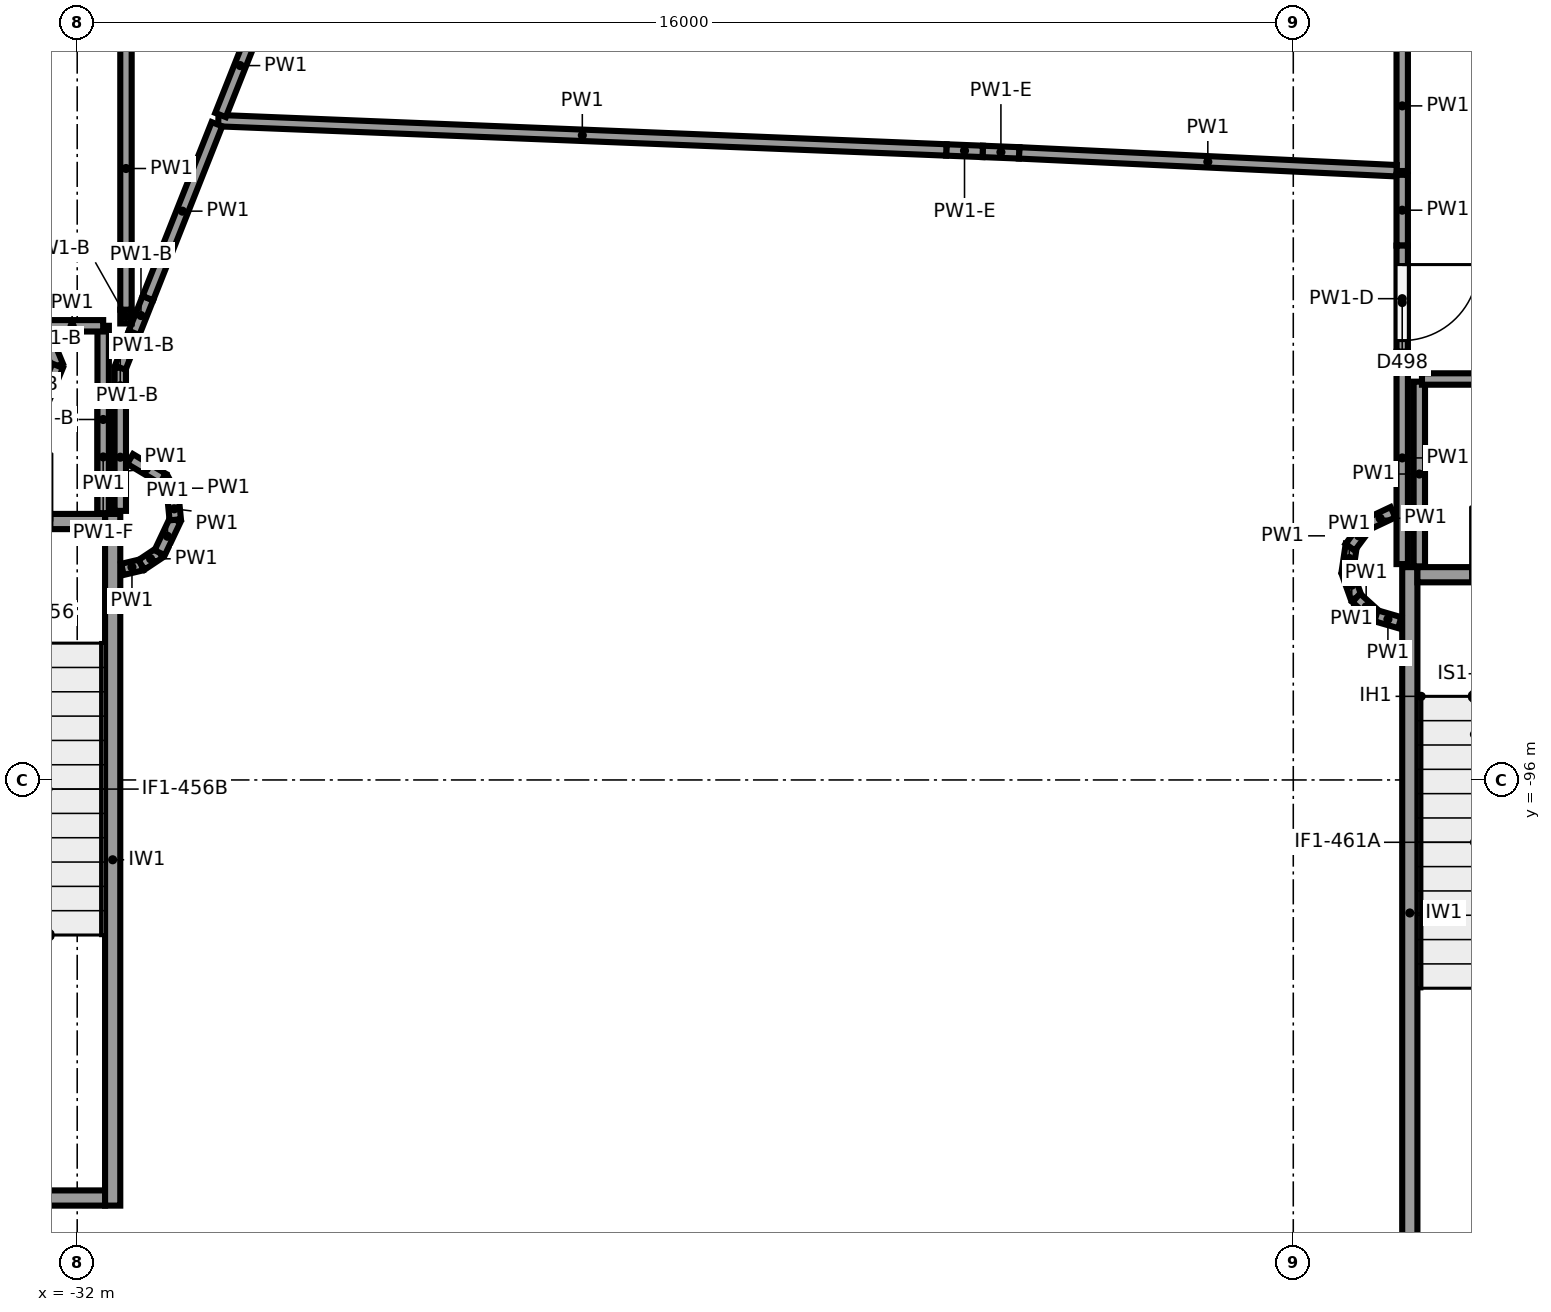
"""IFC4 building model, lengths in metres.
Left out: names, types, materials, properties, quantities, classifications, styles, units other than length and angle.
Written with IfcOpenShell. Run it as: python <this file> out.ifc"""

import sys

from ifc_helpers import new_model, si_unit, direction, frame, frame_2d, origin, origin_2d, place, context, subcontext, project, spatial, rectangle, circle, extrude, element, fill, save


model = new_model("IFC4")
c1 = context("Model", 3, precision=1e-05, world=origin(), true_north=direction((0.0, 1.0)))
c2 = subcontext(c1, "Body", "Model", "MODEL_VIEW")
j1 = project(units=[si_unit("LENGTHUNIT", "METRE"), si_unit("PLANEANGLEUNIT", "RADIAN")], contexts=[c1])
p1 = place(None, origin())
s1 = spatial("IfcSite", under=j1, at=p1, CompositionType="ELEMENT")
p2 = place(p1, origin())
s2 = spatial("IfcBuilding", under=s1, at=p2, CompositionType="ELEMENT")
p3 = place(p2, frame((0.0, 0.0, -4.0)))
s3 = spatial("IfcBuildingStorey", under=s2, at=p3, CompositionType="ELEMENT", Elevation=-4.0)
for number, where, z_axis, x_axis in (
    (1, (-20.65, -89.656, -0.4), (0.0, 0.0, 1.0), (1.0, 0.0, 0.0)),
    (2, (-23.0, -98.6, -0.4), (0.0, 0.0, 1.0), (1.0, 0.0, 0.0)),
):
    element("IfcColumn", number, at=place(p3, frame(where, z_axis=z_axis, x_axis=x_axis)), inside=s3, PredefinedType="COLUMN", context=c2, shape_type="SweptSolid", body=[
        extrude(circle(Radius=0.45, at=origin_2d()), origin(), (0.0, 0.0, 1.0), 4.4),
    ])
p4 = place(p3, frame((-31.533, -101.6, -1.2), z_axis=(0.0, 0.0, 1.0), x_axis=(0.0, 1.0, 0.0)))
e3 = element("IfcWall", 3, at=p4, inside=s3, PredefinedType="SHEAR", context=c2, shape_type="SweptSolid", body=[
    extrude(rectangle(XDim=9.1, YDim=0.2, at=frame_2d((4.55, 0.0))), origin(), (0.0, 0.0, 1.0), 4.8),
])
p5 = place(p3, frame((-38.233, -101.5, -1.2), z_axis=(0.0, 0.0, 1.0), x_axis=(1.0, 0.0, 0.0)))
e4 = element("IfcWall", 4, at=p5, inside=s3, PredefinedType="SHEAR", context=c2, shape_type="SweptSolid", body=[
    extrude(rectangle(XDim=6.6, YDim=0.2, at=frame_2d((3.3, 0.0))), origin(), (0.0, 0.0, 1.0), 4.8),
])
p6 = place(p3, frame((-34.833, -92.6, -1.2), z_axis=(0.0, 0.0, 1.0), x_axis=(1.0, 0.0, 0.0)))
e5 = element("IfcWall", 5, at=p6, inside=s3, PredefinedType="SHEAR", context=c2, shape_type="SweptSolid", body=[
    extrude(rectangle(XDim=3.2, YDim=0.2, at=frame_2d((1.6, 0.0))), origin(), (0.0, 0.0, 1.0), 4.8),
])
p7 = place(p6, frame((0.7, 0.0, 1.2)))
e6 = element("IfcOpeningElement", 6, at=p7, cuts=e5, PredefinedType="OPENING", context=c2, shape_type="SweptSolid", body=[
    extrude(rectangle(XDim=1.8, YDim=2.1, at=frame_2d((0.9, 1.05))), frame((0.0, 0.11, 0.0), z_axis=(0.0, -1.0, 0.0), x_axis=(1.0, 0.0, 0.0)), (0.0, 0.0, 1.0), 0.22),
])
p8 = place(p3, frame((-14.467, -102.3, -1.2), z_axis=(0.0, 0.0, 1.0), x_axis=(0.0, 1.0, 0.0)))
e7 = element("IfcWall", 7, at=p8, inside=s3, PredefinedType="SHEAR", context=c2, shape_type="SweptSolid", body=[
    extrude(rectangle(XDim=9.1, YDim=0.2, at=frame_2d((4.55, 0.0))), origin(), (0.0, 0.0, 1.0), 4.8),
])
p9 = place(p3, frame((-14.367, -93.3, -1.2), z_axis=(0.0, 0.0, 1.0), x_axis=(1.0, 0.0, 0.0)))
e8 = element("IfcWall", 8, at=p9, inside=s3, PredefinedType="SHEAR", context=c2, shape_type="SweptSolid", body=[
    extrude(rectangle(XDim=3.2, YDim=0.2, at=frame_2d((1.6, 0.0))), origin(), (0.0, 0.0, 1.0), 4.8),
])
p10 = place(p9, frame((0.7, 0.0, 1.2)))
e9 = element("IfcOpeningElement", 9, at=p10, cuts=e8, PredefinedType="OPENING", context=c2, shape_type="SweptSolid", body=[
    extrude(rectangle(XDim=1.8, YDim=2.1, at=frame_2d((0.9, 1.05))), frame((0.0, 0.11, 0.0), z_axis=(0.0, -1.0, 0.0), x_axis=(1.0, 0.0, 0.0)), (0.0, 0.0, 1.0), 0.22),
])
p11 = place(p3, frame((-14.567, -86.275, 0.0), z_axis=(0.0, 0.0, 1.0), x_axis=(0.0, -1.0, 0.0)))
e10 = element("IfcWall", 10, at=p11, inside=s3, PredefinedType="PARTITIONING", context=c2, shape_type="SweptSolid", body=[
    extrude(rectangle(XDim=1.714, YDim=0.15, at=frame_2d((0.857, 0.0))), origin(), (0.0, 0.0, 1.0), 3.6),
])
p12 = place(p3, frame((-14.642, -87.985, 0.0), z_axis=(0.0, 0.0, 1.0), x_axis=(-0.998880990071, 0.047294478265, 0.0)))
e11 = element("IfcWall", 11, at=p12, inside=s3, PredefinedType="PARTITIONING", context=c2, shape_type="SweptSolid", body=[
    extrude(rectangle(XDim=4.971, YDim=0.15, at=frame_2d((2.486, 0.0))), origin(), (0.0, 0.0, 1.0), 3.6),
])
p13 = place(p3, frame((-19.607, -87.75, 0.0), z_axis=(0.0, 0.0, 1.0), x_axis=(-0.999190347819, 0.040232435004, 0.0)))
e12 = element("IfcWall", 12, at=p13, inside=s3, PredefinedType="PARTITIONING", context=c2, shape_type="SweptSolid", body=[
    extrude(rectangle(XDim=0.479, YDim=0.15, at=frame_2d((0.24, 0.0))), origin(), (0.0, 0.0, 1.0), 2.85),
])
p14 = place(p3, frame((-20.086, -87.731, 0.0), z_axis=(0.0, 0.0, 1.0), x_axis=(-0.999189522857, 0.040252918055, 0.0)))
e13 = element("IfcWall", 13, at=p14, inside=s3, PredefinedType="PARTITIONING", context=c2, shape_type="SweptSolid", body=[
    extrude(rectangle(XDim=0.479, YDim=0.15, at=frame_2d((0.24, 0.0))), origin(), (0.0, 0.0, 1.0), 2.85),
])
p15 = place(p3, frame((-20.565, -87.711, 0.0), z_axis=(0.0, 0.0, 1.0), x_axis=(-0.999191082899, 0.040214174799, 0.0)))
e14 = element("IfcWall", 14, at=p15, inside=s3, PredefinedType="PARTITIONING", context=c2, shape_type="SweptSolid", body=[
    extrude(rectangle(XDim=9.586, YDim=0.15, at=frame_2d((4.793, 0.0))), origin(), (0.0, 0.0, 1.0), 3.6),
])
p16 = place(p3, frame((-30.114, -87.252, 0.0), z_axis=(0.0, 0.0, 1.0), x_axis=(0.368802456255, 0.929507798924, 0.0)))
e15 = element("IfcWall", 15, at=p16, inside=s3, PredefinedType="PARTITIONING", context=c2, shape_type="SweptSolid", body=[
    extrude(rectangle(XDim=1.399, YDim=0.15, at=frame_2d((0.7, 0.0))), origin(), (0.0, 0.0, 1.0), 3.6),
])
p17 = place(p3, frame((-31.433, -92.46, 0.0), z_axis=(0.0, 0.0, 1.0), x_axis=(0.0, 1.0, 0.0)))
e16 = element("IfcWall", 16, at=p17, inside=s3, PredefinedType="PARTITIONING", context=c2, shape_type="SweptSolid", body=[
    extrude(rectangle(XDim=1.413, YDim=0.15, at=frame_2d((0.706, 0.0))), origin(), (0.0, 0.0, 1.0), 3.6),
])
p18 = place(p3, frame((-31.433, -91.047, 0.0), z_axis=(0.0, 0.0, 1.0), x_axis=(0.0, 1.0, 0.0)))
e17 = element("IfcWall", 17, at=p18, inside=s3, PredefinedType="PARTITIONING", context=c2, shape_type="SweptSolid", body=[
    extrude(rectangle(XDim=0.471, YDim=0.15, at=frame_2d((0.235, 0.0))), origin(), (0.0, 0.0, 1.0), 2.5),
])
for number, where, z_axis, x_axis in (
    (18, (-31.433, -90.577, 0.0), (0.0, 0.0, 1.0), (0.369, 0.929, 0.0)),
    (19, (-31.252, -90.119, 0.0), (0.0, 0.0, 1.0), (0.369, 0.929, 0.0)),
):
    element("IfcWall", number, at=place(p3, frame(where, z_axis=z_axis, x_axis=x_axis)), inside=s3, PredefinedType="PARTITIONING", context=c2, shape_type="SweptSolid", body=[
        extrude(rectangle(XDim=0.492, YDim=0.15, at=frame_2d((0.246, 0.0))), origin(), (0.0, 0.0, 1.0), 2.5),
    ])
p19 = place(p3, frame((-31.07, -89.661, 0.0), z_axis=(0.0, 0.0, 1.0), x_axis=(0.368825125467, 0.9294988041, 0.0)))
e20 = element("IfcWall", 20, at=p19, inside=s3, PredefinedType="PARTITIONING", context=c2, shape_type="SweptSolid", body=[
    extrude(rectangle(XDim=2.462, YDim=0.15, at=frame_2d((1.231, 0.0))), origin(), (0.0, 0.0, 1.0), 3.6),
])
p20 = place(p3, frame((-14.567, -88.039, 0.0), z_axis=(0.0, 0.0, 1.0), x_axis=(0.0, -1.0, 0.0)))
e21 = element("IfcWall", 21, at=p20, inside=s3, PredefinedType="PARTITIONING", context=c2, shape_type="SweptSolid", body=[
    extrude(rectangle(XDim=0.931, YDim=0.15, at=frame_2d((0.466, 0.0))), origin(), (0.0, 0.0, 1.0), 3.6),
])
p21 = place(p3, frame((-14.567, -88.97, 0.0), z_axis=(0.0, 0.0, 1.0), x_axis=(0.0, -1.0, 0.0)))
e22 = element("IfcWall", 22, at=p21, inside=s3, PredefinedType="PARTITIONING", context=c2, shape_type="SweptSolid", body=[
    extrude(rectangle(XDim=1.397, YDim=0.15, at=frame_2d((0.698, 0.0))), origin(), (0.0, 0.0, 1.0), 2.3),
])
p22 = place(p21, frame((0.25, 0.0, 0.0)))
e23 = element("IfcOpeningElement", 23, at=p22, cuts=e22, PredefinedType="OPENING", context=c2, shape_type="SweptSolid", body=[
    extrude(rectangle(XDim=1.0, YDim=2.1, at=frame_2d((0.5, 1.05))), frame((0.0, 0.085, 0.0), z_axis=(0.0, -1.0, 0.0), x_axis=(1.0, 0.0, 0.0)), (0.0, 0.0, 1.0), 0.17),
])
p23 = place(p3, frame((-14.567, -90.366, 0.0), z_axis=(0.0, 0.0, 1.0), x_axis=(0.0, -1.0, 0.0)))
e24 = element("IfcWall", 24, at=p23, inside=s3, PredefinedType="PARTITIONING", context=c2, shape_type="SweptSolid", body=[
    extrude(rectangle(XDim=2.793, YDim=0.15, at=frame_2d((1.397, 0.0))), origin(), (0.0, 0.0, 1.0), 3.6),
])
p24 = place(p3, frame((-31.658, -92.49, 0.0), z_axis=(0.0, 0.0, 1.0), x_axis=(0.0, 1.0, 0.0)))
e25 = element("IfcWall", 25, at=p24, inside=s3, PredefinedType="PARTITIONING", context=c2, shape_type="SweptSolid", body=[
    extrude(rectangle(XDim=2.465, YDim=0.15, at=frame_2d((1.232, 0.0))), origin(), (0.0, 0.0, 1.0), 2.5),
])
p25 = place(p3, frame((-31.658, -92.49, 2.5), z_axis=(0.0, 0.0, 1.0), x_axis=(0.0, 1.0, 0.0)))
e26 = element("IfcWall", 26, at=p25, inside=s3, PredefinedType="PARTITIONING", context=c2, shape_type="SweptSolid", body=[
    extrude(rectangle(XDim=1.479, YDim=0.15, at=frame_2d((0.74, 0.0))), origin(), (0.0, 0.0, 1.0), 1.1),
])
p26 = place(p3, frame((-31.658, -90.025, 0.0), z_axis=(0.0, 0.0, 1.0), x_axis=(-1.0, 0.0, 0.0)))
e27 = element("IfcWall", 27, at=p26, inside=s3, PredefinedType="PARTITIONING", context=c2, shape_type="SweptSolid", body=[
    extrude(rectangle(XDim=0.817, YDim=0.15, at=frame_2d((0.409, 0.0))), origin(), (0.0, 0.0, 1.0), 3.6),
])
p27 = place(p3, frame((-32.475, -90.025, 0.0), z_axis=(0.0, 0.0, 1.0), x_axis=(0.382452777268, -0.923975039252, 0.0)))
e28 = element("IfcWall", 28, at=p27, inside=s3, PredefinedType="PARTITIONING", context=c2, shape_type="SweptSolid", body=[
    extrude(rectangle(XDim=0.569, YDim=0.15, at=frame_2d((0.285, 0.0))), origin(), (0.0, 0.0, 1.0), 2.5),
])
p28 = place(p3, frame((-32.258, -90.551, 0.0), z_axis=(0.0, 0.0, 1.0), x_axis=(-0.382666625355, -0.923886494024, 0.0)))
e29 = element("IfcWall", 29, at=p28, inside=s3, PredefinedType="PARTITIONING", context=c2, shape_type="SweptSolid", body=[
    extrude(rectangle(XDim=0.525, YDim=0.15, at=frame_2d((0.263, 0.0))), origin(), (0.0, 0.0, 1.0), 2.5),
])
p29 = place(p3, frame((-31.405, -93.23, 0.0), z_axis=(0.0, 0.0, 1.0), x_axis=(0.973130593004, 0.230253879357, 0.0)))
e30 = element("IfcWall", 30, at=p29, inside=s3, PredefinedType="PARTITIONING", context=c2, shape_type="SweptSolid", body=[
    extrude(rectangle(XDim=0.258, YDim=0.15, at=frame_2d((0.129, 0.0))), origin(), (0.0, 0.0, 1.0), 3.6),
])
p30 = place(p3, frame((-31.154, -93.17, 0.0), z_axis=(0.0, 0.0, 1.0), x_axis=(0.831397130511, 0.555678694372, 0.0)))
e31 = element("IfcWall", 31, at=p30, inside=s3, PredefinedType="PARTITIONING", context=c2, shape_type="SweptSolid", body=[
    extrude(rectangle(XDim=0.288, YDim=0.15, at=frame_2d((0.144, 0.0))), origin(), (0.0, 0.0, 1.0), 3.6),
])
p31 = place(p3, frame((-30.915, -93.01, 0.0), z_axis=(0.0, 0.0, 1.0), x_axis=(0.427757963167, 0.903893315025, 0.0)))
e32 = element("IfcWall", 32, at=p31, inside=s3, PredefinedType="PARTITIONING", context=c2, shape_type="SweptSolid", body=[
    extrude(rectangle(XDim=0.479, YDim=0.15, at=frame_2d((0.24, 0.0))), origin(), (0.0, 0.0, 1.0), 3.6),
])
p32 = place(p3, frame((-30.71, -92.577, 0.0), z_axis=(0.0, 0.0, 1.0), x_axis=(-0.0978334953, 0.99520279702, 0.0)))
e33 = element("IfcWall", 33, at=p32, inside=s3, PredefinedType="PARTITIONING", context=c2, shape_type="SweptSolid", body=[
    extrude(rectangle(XDim=0.29, YDim=0.15, at=frame_2d((0.145, 0.0))), origin(), (0.0, 0.0, 1.0), 3.6),
])
p33 = place(p3, frame((-30.738, -92.289, 0.0), z_axis=(0.0, 0.0, 1.0), x_axis=(-0.471682765858, 0.881768319, 0.0)))
e34 = element("IfcWall", 34, at=p33, inside=s3, PredefinedType="PARTITIONING", context=c2, shape_type="SweptSolid", body=[
    extrude(rectangle(XDim=0.289, YDim=0.15, at=frame_2d((0.145, 0.0))), origin(), (0.0, 0.0, 1.0), 3.6),
])
p34 = place(p3, frame((-30.875, -92.034, 0.0), z_axis=(0.0, 0.0, 1.0), x_axis=(-0.85856712863, 0.512701166017, 0.0)))
e35 = element("IfcWall", 35, at=p34, inside=s3, PredefinedType="PARTITIONING", context=c2, shape_type="SweptSolid", body=[
    extrude(rectangle(XDim=0.5, YDim=0.15, at=frame_2d((0.25, 0.0))), origin(), (0.0, 0.0, 1.0), 3.6),
])
p35 = place(p3, frame((-31.358, -89.994, 0.0), z_axis=(0.0, 0.0, 1.0), x_axis=(0.0, 1.0, 0.0)))
e36 = element("IfcWall", 36, at=p35, inside=s3, PredefinedType="PARTITIONING", context=c2, shape_type="SweptSolid", body=[
    extrude(rectangle(XDim=0.181, YDim=0.15, at=frame_2d((0.09, 0.0))), origin(), (0.0, 0.0, 1.0), 2.5),
])
p36 = place(p3, frame((-31.358, -89.813, 0.0), z_axis=(0.0, 0.0, 1.0), x_axis=(0.0, 1.0, 0.0)))
e37 = element("IfcWall", 37, at=p36, inside=s3, PredefinedType="PARTITIONING", context=c2, shape_type="SweptSolid", body=[
    extrude(rectangle(XDim=3.715, YDim=0.15, at=frame_2d((1.857, 0.0))), origin(), (0.0, 0.0, 1.0), 3.6),
])
p37 = place(p3, frame((-14.342, -90.76, 0.0), z_axis=(0.0, 0.0, 1.0), x_axis=(0.0, -1.0, 0.0)))
e38 = element("IfcWall", 38, at=p37, inside=s3, PredefinedType="PARTITIONING", context=c2, shape_type="SweptSolid", body=[
    extrude(rectangle(XDim=2.43, YDim=0.15, at=frame_2d((1.215, 0.0))), origin(), (0.0, 0.0, 1.0), 3.6),
])
p38 = place(p3, frame((-10.327, -90.725, 0.0), z_axis=(0.0, 0.0, 1.0), x_axis=(-1.0, 0.0, 0.0)))
e39 = element("IfcWall", 39, at=p38, inside=s3, PredefinedType="PARTITIONING", context=c2, shape_type="SweptSolid", body=[
    extrude(rectangle(XDim=3.98, YDim=0.15, at=frame_2d((1.99, 0.0))), origin(), (0.0, 0.0, 1.0), 3.6),
])
p39 = place(p38, frame((1.05, 0.0, 0.0)))
e40 = element("IfcOpeningElement", 40, at=p39, cuts=e39, PredefinedType="OPENING", context=c2, shape_type="SweptSolid", body=[
    extrude(rectangle(XDim=1.8, YDim=2.1, at=frame_2d((0.9, 1.05))), frame((0.0, 0.085, 0.0), z_axis=(0.0, -1.0, 0.0), x_axis=(1.0, 0.0, 0.0)), (0.0, 0.0, 1.0), 0.17),
])
p40 = place(p3, frame((-15.236, -92.901, 0.0), z_axis=(0.0, 0.0, 1.0), x_axis=(-0.146525059696, -0.989206958569, 0.0)))
e41 = element("IfcWall", 41, at=p40, inside=s3, PredefinedType="PARTITIONING", context=c2, shape_type="SweptSolid", body=[
    extrude(rectangle(XDim=0.375, YDim=0.15, at=frame_2d((0.188, 0.0))), origin(), (0.0, 0.0, 1.0), 3.6),
])
p41 = place(p3, frame((-15.291, -93.271, 0.0), z_axis=(0.0, 0.0, 1.0), x_axis=(0.337299504999, -0.941397388953, 0.0)))
e42 = element("IfcWall", 42, at=p41, inside=s3, PredefinedType="PARTITIONING", context=c2, shape_type="SweptSolid", body=[
    extrude(rectangle(XDim=0.353, YDim=0.15, at=frame_2d((0.177, 0.0))), origin(), (0.0, 0.0, 1.0), 3.6),
])
p42 = place(p3, frame((-15.171, -93.604, 0.0), z_axis=(0.0, 0.0, 1.0), x_axis=(0.740598647482, -0.671947649261, 0.0)))
e43 = element("IfcWall", 43, at=p42, inside=s3, PredefinedType="PARTITIONING", context=c2, shape_type="SweptSolid", body=[
    extrude(rectangle(XDim=0.352, YDim=0.15, at=frame_2d((0.176, 0.0))), origin(), (0.0, 0.0, 1.0), 3.6),
])
p43 = place(p3, frame((-14.911, -93.841, 0.0), z_axis=(0.0, 0.0, 1.0), x_axis=(0.96043719229, -0.278496678015, 0.0)))
e44 = element("IfcWall", 44, at=p43, inside=s3, PredefinedType="PARTITIONING", context=c2, shape_type="SweptSolid", body=[
    extrude(rectangle(XDim=0.324, YDim=0.15, at=frame_2d((0.162, 0.0))), origin(), (0.0, 0.0, 1.0), 3.6),
])
p44 = place(p3, frame((-14.688, -92.477, 0.0), z_axis=(0.0, 0.0, 1.0), x_axis=(-0.904686382363, -0.426078102661, 0.0)))
e45 = element("IfcWall", 45, at=p44, inside=s3, PredefinedType="PARTITIONING", context=c2, shape_type="SweptSolid", body=[
    extrude(rectangle(XDim=0.376, YDim=0.15, at=frame_2d((0.188, 0.0))), origin(), (0.0, 0.0, 1.0), 3.6),
])
p45 = place(p3, frame((-15.028, -92.638, 0.0), z_axis=(0.0, 0.0, 1.0), x_axis=(-0.595507982628, -0.803349390132, 0.0)))
e46 = element("IfcWall", 46, at=p45, inside=s3, PredefinedType="PARTITIONING", context=c2, shape_type="SweptSolid", body=[
    extrude(rectangle(XDim=0.375, YDim=0.15, at=frame_2d((0.188, 0.0))), origin(), (0.0, 0.0, 1.0), 3.6),
])
p46 = place(p10, origin())
e47 = element("IfcDoor", 47, at=p46, inside=s3, OperationType="DOUBLE_DOOR_SINGLE_SWING", PredefinedType="DOOR", context=c2, shape_type="SweptSolid", body=[
    extrude(rectangle(XDim=1.8, YDim=2.1, at=frame_2d((0.9, 1.05))), frame((0.0, 0.025, 0.0), z_axis=(0.0, -1.0, 0.0), x_axis=(1.0, 0.0, 0.0)), (0.0, 0.0, 1.0), 0.05),
])
fill(e9, e47)
p47 = place(p22, origin())
e48 = element("IfcDoor", 48, at=p47, inside=s3, OperationType="SINGLE_SWING_LEFT", PredefinedType="DOOR", context=c2, shape_type="SweptSolid", body=[
    extrude(rectangle(XDim=1.0, YDim=2.1, at=frame_2d((0.5, 1.05))), frame((0.0, 0.025, 0.0), z_axis=(0.0, -1.0, 0.0), x_axis=(1.0, 0.0, 0.0)), (0.0, 0.0, 1.0), 0.05),
])
fill(e23, e48)
save(model, sys.argv[1])
